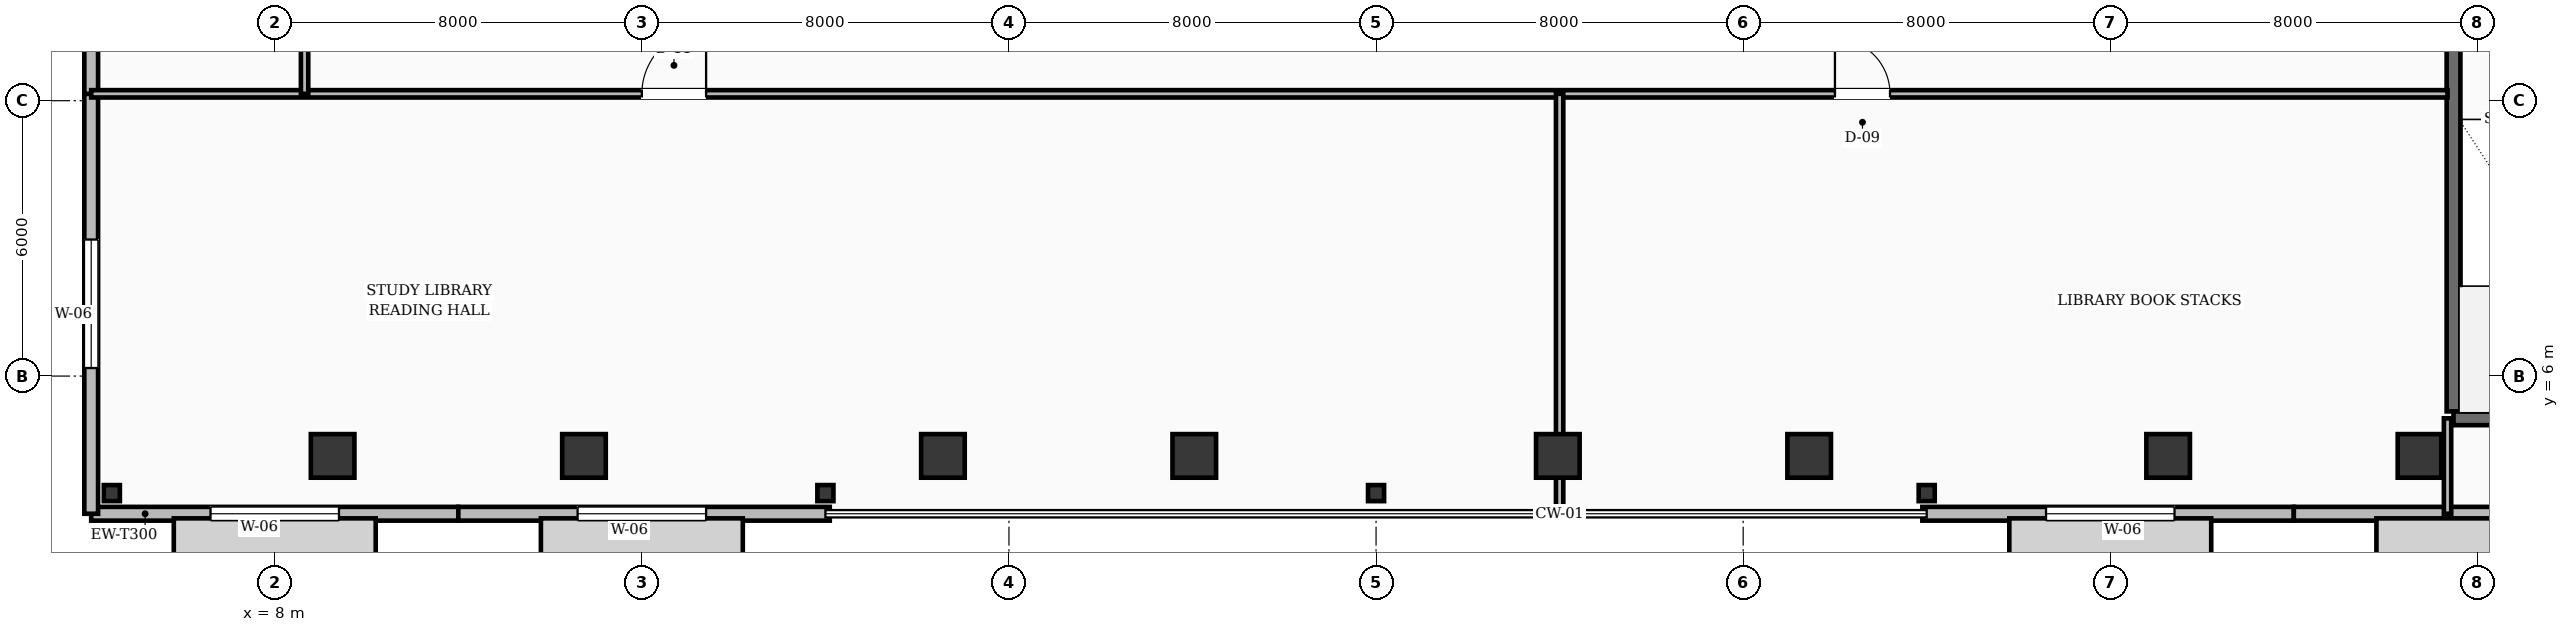
"""IFC4 building model, lengths in metres.
Left out: names, types, materials, properties, quantities, classifications, styles, units other than length and angle.
Written with IfcOpenShell. Run it as: python <this file> out.ifc"""

import sys

from ifc_helpers import new_model, si_unit, direction, frame, frame_2d, origin, origin_2d, place, context, subcontext, project, spatial, rectangle, hollow_circle, i_section, extrude, element, fill, save


model = new_model("IFC4")
c1 = context("Model", 3, precision=1e-05, world=origin(), true_north=direction((0.0, 1.0)))
c2 = subcontext(c1, "Body", "Model", "MODEL_VIEW")
j1 = project(units=[si_unit("LENGTHUNIT", "METRE"), si_unit("PLANEANGLEUNIT", "RADIAN")], contexts=[c1])
p1 = place(None, origin())
s1 = spatial("IfcSite", under=j1, at=p1, CompositionType="ELEMENT")
p2 = place(p1, origin())
s2 = spatial("IfcBuilding", under=s1, at=p2, CompositionType="ELEMENT")
p3 = place(p2, frame((0.0, 0.0, 14.8)))
s3 = spatial("IfcBuildingStorey", under=s2, at=p3, CompositionType="ELEMENT", Elevation=14.8)
p4 = place(p3, frame((55.48, 5.23, 0.0), z_axis=(0.0, 0.0, 1.0), x_axis=(0.0, 1.0, 0.0)))
e1 = element("IfcWall", 1, at=p4, inside=s3, PredefinedType="SHEAR", context=c2, shape_type="SweptSolid", body=[
    extrude(rectangle(XDim=8.34, YDim=0.3, at=frame_2d((4.17, 0.0))), origin(), (0.0, 0.0, 1.0), 4.8),
])
p5 = place(p3, frame((55.48, 5.08, 0.0), z_axis=(0.0, 0.0, 1.0), x_axis=(1.0, 0.0, 0.0)))
e2 = element("IfcWall", 2, at=p5, inside=s3, PredefinedType="SHEAR", context=c2, shape_type="SweptSolid", body=[
    extrude(rectangle(XDim=4.44, YDim=0.3, at=frame_2d((2.22, 0.0))), origin(), (0.0, 0.0, 1.0), 4.8),
])
for number, where, z_axis, x_axis in (
    (3, (4.45, 3.45, 0.0), (0.0, 0.0, 1.0), (1.0, 0.0, 0.0)),
    (4, (20.0, 3.45, 0.0), (0.0, 0.0, 1.0), (1.0, 0.0, 0.0)),
    (5, (32.0, 3.45, 0.0), (0.0, 0.0, 1.0), (1.0, 0.0, 0.0)),
    (6, (44.0, 3.45, 0.0), (0.0, 0.0, 1.0), (1.0, 0.0, 0.0)),
):
    element("IfcColumn", number, at=place(p3, frame(where, z_axis=z_axis, x_axis=x_axis)), inside=s3, PredefinedType="COLUMN", context=c2, shape_type="SweptSolid", body=[
        extrude(i_section(OverallWidth=0.35, OverallDepth=0.35, WebThickness=0.012, FlangeThickness=0.019, FilletRadius=0.016, at=origin_2d()), origin(), (0.0, 0.0, 1.0), 4.8),
    ])
for number, where, z_axis, x_axis in (
    (7, (9.515, 4.147, 0.0), (-0.105, 0.047, 0.993), (-0.407, -0.913, 0.0)),
    (8, (14.485, 4.147, 0.0), (0.105, 0.047, 0.993), (-0.407, 0.913, 0.0)),
    (9, (22.815, 4.147, 0.0), (-0.105, 0.047, 0.993), (-0.407, -0.913, 0.0)),
    (10, (27.785, 4.147, 0.0), (0.105, 0.047, 0.993), (-0.407, 0.913, 0.0)),
    (11, (36.215, 4.147, 0.0), (-0.105, 0.047, 0.993), (-0.407, -0.913, 0.0)),
    (12, (41.185, 4.147, 0.0), (0.105, 0.047, 0.993), (-0.407, 0.913, 0.0)),
    (13, (49.515, 4.147, 0.0), (-0.105, 0.047, 0.993), (-0.407, -0.913, 0.0)),
    (14, (54.485, 4.147, 0.0), (0.105, 0.047, 0.993), (-0.407, 0.913, 0.0)),
):
    element("IfcColumn", number, at=place(p3, frame(where, z_axis=z_axis, x_axis=x_axis)), inside=s3, PredefinedType="COLUMN", context=c2, shape_type="SweptSolid", body=[
        extrude(hollow_circle(Radius=0.475, WallThickness=0.045, at=origin_2d()), origin(), (0.0, 0.0, 1.0), 4.832),
    ])
p6 = place(p3, frame((4.0, 3.0, 0.0), z_axis=(0.0, 0.0, 1.0), x_axis=(1.0, 0.0, 0.0)))
e15 = element("IfcWall", 15, at=p6, inside=s3, PredefinedType="STANDARD", context=c2, shape_type="SweptSolid", body=[
    extrude(rectangle(XDim=8.0, YDim=0.3, at=frame_2d((4.0, 0.0))), origin(), (0.0, 0.0, 1.0), 3.57),
])
p7 = place(p6, frame((2.6, 0.0, 0.85)))
e16 = element("IfcOpeningElement", 16, at=p7, cuts=e15, PredefinedType="OPENING", context=c2, shape_type="SweptSolid", body=[
    extrude(rectangle(XDim=2.8, YDim=2.3, at=frame_2d((1.4, 1.15))), frame((0.0, 0.16, 0.0), z_axis=(0.0, -1.0, 0.0), x_axis=(1.0, 0.0, 0.0)), (0.0, 0.0, 1.0), 0.32),
])
p8 = place(p3, frame((12.0, 3.0, 0.0), z_axis=(0.0, 0.0, 1.0), x_axis=(1.0, 0.0, 0.0)))
e17 = element("IfcWall", 17, at=p8, inside=s3, PredefinedType="STANDARD", context=c2, shape_type="SweptSolid", body=[
    extrude(rectangle(XDim=8.095, YDim=0.3, at=frame_2d((4.047, 0.0))), origin(), (0.0, 0.0, 1.0), 3.57),
])
p9 = place(p8, frame((2.6, 0.0, 0.85)))
e18 = element("IfcOpeningElement", 18, at=p9, cuts=e17, PredefinedType="OPENING", context=c2, shape_type="SweptSolid", body=[
    extrude(rectangle(XDim=2.8, YDim=2.3, at=frame_2d((1.4, 1.15))), frame((0.0, 0.16, 0.0), z_axis=(0.0, -1.0, 0.0), x_axis=(1.0, 0.0, 0.0)), (0.0, 0.0, 1.0), 0.32),
])
p10 = place(p3, frame((43.905, 3.0, 0.0), z_axis=(0.0, 0.0, 1.0), x_axis=(1.0, 0.0, 0.0)))
e19 = element("IfcWall", 19, at=p10, inside=s3, PredefinedType="STANDARD", context=c2, shape_type="SweptSolid", body=[
    extrude(rectangle(XDim=8.095, YDim=0.3, at=frame_2d((4.047, 0.0))), origin(), (0.0, 0.0, 1.0), 3.57),
])
p11 = place(p10, frame((2.695, 0.0, 0.85)))
e20 = element("IfcOpeningElement", 20, at=p11, cuts=e19, PredefinedType="OPENING", context=c2, shape_type="SweptSolid", body=[
    extrude(rectangle(XDim=2.8, YDim=2.3, at=frame_2d((1.4, 1.15))), frame((0.0, 0.16, 0.0), z_axis=(0.0, -1.0, 0.0), x_axis=(1.0, 0.0, 0.0)), (0.0, 0.0, 1.0), 0.32),
])
p12 = place(p3, frame((52.0, 3.0, 0.0), z_axis=(0.0, 0.0, 1.0), x_axis=(1.0, 0.0, 0.0)))
e21 = element("IfcWall", 21, at=p12, inside=s3, PredefinedType="STANDARD", context=c2, shape_type="SweptSolid", body=[
    extrude(rectangle(XDim=8.0, YDim=0.3, at=frame_2d((4.0, 0.0))), origin(), (0.0, 0.0, 1.0), 3.57),
])
p13 = place(p3, frame((4.0, 12.15, 0.0), z_axis=(0.0, 0.0, 1.0), x_axis=(0.0, -1.0, 0.0)))
e22 = element("IfcWall", 22, at=p13, inside=s3, PredefinedType="STANDARD", context=c2, shape_type="SweptSolid", body=[
    extrude(rectangle(XDim=9.15, YDim=0.3, at=frame_2d((4.575, 0.0))), origin(), (0.0, 0.0, 1.0), 3.57),
])
p14 = place(p13, frame((3.175, 0.0, 0.85)))
e23 = element("IfcOpeningElement", 23, at=p14, cuts=e22, PredefinedType="OPENING", context=c2, shape_type="SweptSolid", body=[
    extrude(rectangle(XDim=2.8, YDim=2.3, at=frame_2d((1.4, 1.15))), frame((0.0, 0.16, 0.0), z_axis=(0.0, -1.0, 0.0), x_axis=(1.0, 0.0, 0.0)), (0.0, 0.0, 1.0), 0.32),
])
p15 = place(p3, frame((4.0, 22.0, 0.0), z_axis=(0.0, 0.0, 1.0), x_axis=(0.0, -1.0, 0.0)))
e24 = element("IfcWall", 24, at=p15, inside=s3, PredefinedType="STANDARD", context=c2, shape_type="SweptSolid", body=[
    extrude(rectangle(XDim=9.85, YDim=0.3, at=frame_2d((4.925, 0.0))), origin(), (0.0, 0.0, 1.0), 3.57),
])
p16 = place(p15, frame((3.525, 0.0, 0.85)))
e25 = element("IfcOpeningElement", 25, at=p16, cuts=e24, PredefinedType="OPENING", context=c2, shape_type="SweptSolid", body=[
    extrude(rectangle(XDim=2.8, YDim=2.3, at=frame_2d((1.4, 1.15))), frame((0.0, 0.16, 0.0), z_axis=(0.0, -1.0, 0.0), x_axis=(1.0, 0.0, 0.0)), (0.0, 0.0, 1.0), 0.32),
])
p17 = place(p3, frame((4.0, 12.15, 0.0), z_axis=(0.0, 0.0, 1.0), x_axis=(1.0, 0.0, 0.0)))
e26 = element("IfcWall", 26, at=p17, inside=s3, PredefinedType="SOLIDWALL", context=c2, shape_type="SweptSolid", body=[
    extrude(rectangle(XDim=51.35, YDim=0.16, at=frame_2d((25.675, 0.0))), origin(), (0.0, 0.0, 1.0), 3.52),
])
p18 = place(p17, frame((12.0, 0.0, 0.0)))
e27 = element("IfcOpeningElement", 27, at=p18, cuts=e26, PredefinedType="OPENING", context=c2, shape_type="SweptSolid", body=[
    extrude(rectangle(XDim=1.4, YDim=2.15, at=frame_2d((0.7, 1.075))), frame((0.0, 0.09, 0.0), z_axis=(0.0, -1.0, 0.0), x_axis=(1.0, 0.0, 0.0)), (0.0, 0.0, 1.0), 0.18),
])
p19 = place(p17, frame((38.0, 0.0, 0.0)))
e28 = element("IfcOpeningElement", 28, at=p19, cuts=e26, PredefinedType="OPENING", context=c2, shape_type="SweptSolid", body=[
    extrude(rectangle(XDim=1.2, YDim=2.1, at=frame_2d((0.6, 1.05))), frame((0.0, 0.09, 0.0), z_axis=(0.0, -1.0, 0.0), x_axis=(1.0, 0.0, 0.0)), (0.0, 0.0, 1.0), 0.18),
])
p20 = place(p3, frame((8.65, 12.15, 0.0), z_axis=(0.0, 0.0, 1.0), x_axis=(0.0, 1.0, 0.0)))
e29 = element("IfcWall", 29, at=p20, inside=s3, PredefinedType="SOLIDWALL", context=c2, shape_type="SweptSolid", body=[
    extrude(rectangle(XDim=20.25, YDim=0.16, at=frame_2d((10.125, 0.0))), origin(), (0.0, 0.0, 1.0), 3.52),
])
p21 = place(p20, frame((8.0, 0.0, 0.0)))
e30 = element("IfcOpeningElement", 30, at=p21, cuts=e29, PredefinedType="OPENING", context=c2, shape_type="SweptSolid", body=[
    extrude(rectangle(XDim=1.0, YDim=2.1, at=frame_2d((0.5, 1.05))), frame((0.0, 0.09, 0.0), z_axis=(0.0, -1.0, 0.0), x_axis=(1.0, 0.0, 0.0)), (0.0, 0.0, 1.0), 0.18),
])
p22 = place(p3, frame((36.0, 3.0, 0.0), z_axis=(0.0, 0.0, 1.0), x_axis=(0.0, 1.0, 0.0)))
e31 = element("IfcWall", 31, at=p22, inside=s3, PredefinedType="SOLIDWALL", context=c2, shape_type="SweptSolid", body=[
    extrude(rectangle(XDim=9.15, YDim=0.16, at=frame_2d((4.575, 0.0))), origin(), (0.0, 0.0, 1.0), 3.52),
])
p23 = place(p3, frame((55.35, 3.0, 0.0), z_axis=(0.0, 0.0, 1.0), x_axis=(0.0, 1.0, 0.0)))
e32 = element("IfcWall", 32, at=p23, inside=s3, PredefinedType="SOLIDWALL", context=c2, shape_type="SweptSolid", body=[
    extrude(rectangle(XDim=2.08, YDim=0.16, at=frame_2d((1.04, 0.0))), origin(), (0.0, 0.0, 1.0), 3.52),
])
p24 = place(p7, origin())
e33 = element("IfcWindow", 33, at=p24, inside=s3, PartitioningType="SINGLE_PANEL", PredefinedType="WINDOW", context=c2, shape_type="SweptSolid", body=[
    extrude(rectangle(XDim=2.8, YDim=2.3, at=frame_2d((1.4, 1.15))), frame((0.0, 0.03, 0.0), z_axis=(0.0, -1.0, 0.0), x_axis=(1.0, 0.0, 0.0)), (0.0, 0.0, 1.0), 0.06),
])
fill(e16, e33)
p25 = place(p9, origin())
e34 = element("IfcWindow", 34, at=p25, inside=s3, PartitioningType="SINGLE_PANEL", PredefinedType="WINDOW", context=c2, shape_type="SweptSolid", body=[
    extrude(rectangle(XDim=2.8, YDim=2.3, at=frame_2d((1.4, 1.15))), frame((0.0, 0.03, 0.0), z_axis=(0.0, -1.0, 0.0), x_axis=(1.0, 0.0, 0.0)), (0.0, 0.0, 1.0), 0.06),
])
fill(e18, e34)
p26 = place(p11, origin())
e35 = element("IfcWindow", 35, at=p26, inside=s3, PartitioningType="SINGLE_PANEL", PredefinedType="WINDOW", context=c2, shape_type="SweptSolid", body=[
    extrude(rectangle(XDim=2.8, YDim=2.3, at=frame_2d((1.4, 1.15))), frame((0.0, 0.03, 0.0), z_axis=(0.0, -1.0, 0.0), x_axis=(1.0, 0.0, 0.0)), (0.0, 0.0, 1.0), 0.06),
])
fill(e20, e35)
p27 = place(p14, origin())
e36 = element("IfcWindow", 36, at=p27, inside=s3, PartitioningType="SINGLE_PANEL", PredefinedType="WINDOW", context=c2, shape_type="SweptSolid", body=[
    extrude(rectangle(XDim=2.8, YDim=2.3, at=frame_2d((1.4, 1.15))), frame((0.0, 0.03, 0.0), z_axis=(0.0, -1.0, 0.0), x_axis=(1.0, 0.0, 0.0)), (0.0, 0.0, 1.0), 0.06),
])
fill(e23, e36)
p28 = place(p18, origin())
e37 = element("IfcDoor", 37, at=p28, inside=s3, OperationType="SINGLE_SWING_RIGHT", PredefinedType="DOOR", context=c2, shape_type="SweptSolid", body=[
    extrude(rectangle(XDim=1.4, YDim=2.15, at=frame_2d((0.7, 1.075))), frame((0.0, 0.025, 0.0), z_axis=(0.0, -1.0, 0.0), x_axis=(1.0, 0.0, 0.0)), (0.0, 0.0, 1.0), 0.05),
])
fill(e27, e37)
p29 = place(p19, origin())
e38 = element("IfcDoor", 38, at=p29, inside=s3, OperationType="SINGLE_SWING_LEFT", PredefinedType="DOOR", context=c2, shape_type="SweptSolid", body=[
    extrude(rectangle(XDim=1.2, YDim=2.1, at=frame_2d((0.6, 1.05))), frame((0.0, 0.025, 0.0), z_axis=(0.0, -1.0, 0.0), x_axis=(1.0, 0.0, 0.0)), (0.0, 0.0, 1.0), 0.05),
])
fill(e28, e38)
save(model, sys.argv[1])
